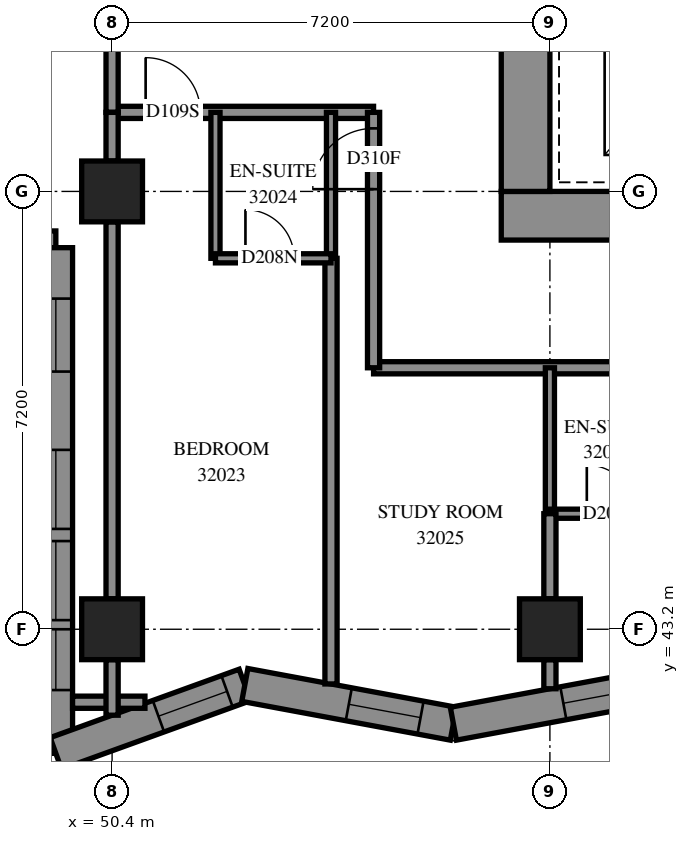
"""IFC4 building model, lengths in metres.
Left out: names, types, materials, properties, quantities, classifications, styles, units other than length and angle.
Written with IfcOpenShell. Run it as: python <this file> out.ifc"""

import sys

from ifc_helpers import new_model, si_unit, direction, frame, frame_2d, origin, origin_2d, place, context, subcontext, project, spatial, polyline, rectangle, outline, extrude, element, fill, save


model = new_model("IFC4")
c1 = context("Model", 3, precision=1e-05, world=origin(), true_north=direction((0.0, 1.0)))
c2 = subcontext(c1, "Body", "Model", "MODEL_VIEW")
j1 = project(units=[si_unit("LENGTHUNIT", "METRE"), si_unit("PLANEANGLEUNIT", "RADIAN")], contexts=[c1])
p1 = place(None, origin())
s1 = spatial("IfcSite", under=j1, at=p1, CompositionType="ELEMENT")
p2 = place(p1, origin())
s2 = spatial("IfcBuilding", under=s1, at=p2, CompositionType="ELEMENT")
p3 = place(p2, frame((0.0, 0.0, 118.6)))
s3 = spatial("IfcBuildingStorey", under=s2, at=p3, CompositionType="ELEMENT", Elevation=118.6)
for number, where, z_axis, x_axis in (
    (1, (50.4, 43.2, 0.0), (0.0, 0.0, 1.0), (1.0, 0.0, 0.0)),
    (2, (50.4, 50.4, 0.0), (0.0, 0.0, 1.0), (1.0, 0.0, 0.0)),
    (3, (57.6, 43.2, 0.0), (0.0, 0.0, 1.0), (1.0, 0.0, 0.0)),
):
    element("IfcColumn", number, at=place(p3, frame(where, z_axis=z_axis, x_axis=x_axis)), inside=s3, PredefinedType="COLUMN", context=c2, shape_type="SweptSolid", body=[
        extrude(rectangle(XDim=1.0, YDim=1.0, at=origin_2d()), origin(), (0.0, 0.0, 1.0), 3.1),
    ])
p4 = place(p3, frame((56.8, 50.0, -0.3), z_axis=(0.0, 0.0, 1.0), x_axis=(1.0, 0.0, 0.0)))
e4 = element("IfcWall", 4, at=p4, inside=s3, PredefinedType="SHEAR", context=c2, shape_type="SweptSolid", body=[
    extrude(rectangle(XDim=16.0, YDim=0.8, at=frame_2d((8.0, 0.0))), origin(), (0.0, 0.0, 1.0), 2.7),
])
p5 = place(p3, frame((57.2, 50.4, -0.3), z_axis=(0.0, 0.0, 1.0), x_axis=(0.0, 1.0, 0.0)))
e5 = element("IfcWall", 5, at=p5, inside=s3, PredefinedType="SHEAR", context=c2, shape_type="SweptSolid", body=[
    extrude(rectangle(XDim=14.4, YDim=0.8, at=frame_2d((7.2, 0.0))), origin(), (0.0, 0.0, 1.0), 2.7),
])
p6 = place(p5, frame((4.55, 0.0, 0.3)))
e6 = element("IfcOpeningElement", 6, at=p6, cuts=e5, PredefinedType="OPENING", context=c2, shape_type="SweptSolid", body=[
    extrude(rectangle(XDim=1.1, YDim=2.1, at=frame_2d((0.55, 1.05))), frame((0.0, 0.41, 0.0), z_axis=(0.0, -1.0, 0.0), x_axis=(1.0, 0.0, 0.0)), (0.0, 0.0, 1.0), 0.82),
])
p7 = place(p5, frame((11.35, 0.0, 0.3)))
e7 = element("IfcOpeningElement", 7, at=p7, cuts=e5, PredefinedType="OPENING", context=c2, shape_type="SweptSolid", body=[
    extrude(rectangle(XDim=1.1, YDim=2.1, at=frame_2d((0.55, 1.05))), frame((0.0, 0.41, 0.0), z_axis=(0.0, -1.0, 0.0), x_axis=(1.0, 0.0, 0.0)), (0.0, 0.0, 1.0), 0.82),
])
p8 = place(p3, frame((42.275, 49.475, 0.0), z_axis=(0.0, 0.0, 1.0), x_axis=(1.0, 0.0, 0.0)))
e8 = element("IfcWall", 8, at=p8, inside=s3, PredefinedType="SOLIDWALL", context=c2, shape_type="SweptSolid", body=[
    extrude(outline(polyline([(-0.275, -0.275), (6.925, -0.275), (7.475, 0.275), (0.275, 0.275), (-0.275, -0.275)])), origin(), (0.0, 0.0, 1.0), 3.1),
])
p9 = place(p8, frame((1.325, 0.0, 0.5)))
e9 = element("IfcOpeningElement", 9, at=p9, cuts=e8, PredefinedType="OPENING", context=c2, shape_type="SweptSolid", body=[
    extrude(rectangle(XDim=1.3, YDim=2.45, at=frame_2d((0.65, 1.225))), frame((0.0, 0.285, 0.0), z_axis=(0.0, -1.0, 0.0), x_axis=(1.0, 0.0, 0.0)), (0.0, 0.0, 1.0), 0.57),
])
p10 = place(p8, frame((2.825, 0.0, 0.5)))
e10 = element("IfcOpeningElement", 10, at=p10, cuts=e8, PredefinedType="OPENING", context=c2, shape_type="SweptSolid", body=[
    extrude(rectangle(XDim=1.3, YDim=2.45, at=frame_2d((0.65, 1.225))), frame((0.0, 0.285, 0.0), z_axis=(0.0, -1.0, 0.0), x_axis=(1.0, 0.0, 0.0)), (0.0, 0.0, 1.0), 0.57),
])
p11 = place(p8, frame((5.162, 0.0, 0.5)))
e11 = element("IfcOpeningElement", 11, at=p11, cuts=e8, PredefinedType="OPENING", context=c2, shape_type="SweptSolid", body=[
    extrude(rectangle(XDim=1.2, YDim=2.45, at=frame_2d((0.6, 1.225))), frame((0.0, 0.285, 0.0), z_axis=(0.0, -1.0, 0.0), x_axis=(1.0, 0.0, 0.0)), (0.0, 0.0, 1.0), 0.57),
])
p12 = place(p3, frame((49.475, 49.475, 0.0), z_axis=(0.0, 0.0, 1.0), x_axis=(0.0, -1.0, 0.0)))
e12 = element("IfcWall", 12, at=p12, inside=s3, PredefinedType="SOLIDWALL", context=c2, shape_type="SweptSolid", body=[
    extrude(outline(polyline([(0.275, -0.275), (8.708, -0.275), (7.924, 0.275), (-0.275, 0.275), (0.275, -0.275)])), origin(), (0.0, 0.0, 1.0), 3.1),
])
p13 = place(p12, frame((3.325, 0.0, 0.5)))
e13 = element("IfcOpeningElement", 13, at=p13, cuts=e12, PredefinedType="OPENING", context=c2, shape_type="SweptSolid", body=[
    extrude(rectangle(XDim=1.3, YDim=2.45, at=frame_2d((0.65, 1.225))), frame((0.0, 0.285, 0.0), z_axis=(0.0, -1.0, 0.0), x_axis=(1.0, 0.0, 0.0)), (0.0, 0.0, 1.0), 0.57),
])
p14 = place(p12, frame((4.825, 0.0, 0.5)))
e14 = element("IfcOpeningElement", 14, at=p14, cuts=e12, PredefinedType="OPENING", context=c2, shape_type="SweptSolid", body=[
    extrude(rectangle(XDim=1.3, YDim=2.45, at=frame_2d((0.65, 1.225))), frame((0.0, 0.285, 0.0), z_axis=(0.0, -1.0, 0.0), x_axis=(1.0, 0.0, 0.0)), (0.0, 0.0, 1.0), 0.57),
])
p15 = place(p12, frame((0.838, 0.0, 0.5)))
e15 = element("IfcOpeningElement", 15, at=p15, cuts=e12, PredefinedType="OPENING", context=c2, shape_type="SweptSolid", body=[
    extrude(rectangle(XDim=1.2, YDim=2.45, at=frame_2d((0.6, 1.225))), frame((0.0, 0.285, 0.0), z_axis=(0.0, -1.0, 0.0), x_axis=(1.0, 0.0, 0.0)), (0.0, 0.0, 1.0), 0.57),
])
p16 = place(p12, frame((6.275, 0.0, 0.45)))
e16 = element("IfcOpeningElement", 16, at=p16, cuts=e12, PredefinedType="OPENING", context=c2, shape_type="SweptSolid", body=[
    extrude(rectangle(XDim=1.0, YDim=2.5, at=frame_2d((0.5, 1.25))), frame((0.0, 0.285, 0.0), z_axis=(0.0, -1.0, 0.0), x_axis=(1.0, 0.0, 0.0)), (0.0, 0.0, 1.0), 0.57),
])
p17 = place(p3, frame((49.475, 41.159, 0.0), z_axis=(0.0, 0.0, 1.0), x_axis=(0.9402923967, 0.3403677552, 0.0)))
e17 = element("IfcWall", 17, at=p17, inside=s3, PredefinedType="SOLIDWALL", context=c2, shape_type="SweptSolid", body=[
    extrude(outline(polyline([(-0.392, -0.275), (3.231, -0.275), (3.38, 0.275), (0.392, 0.275), (-0.392, -0.275)])), origin(), (0.0, 0.0, 1.0), 3.1),
])
p18 = place(p17, frame((1.794, 0.0, 0.5)))
e18 = element("IfcOpeningElement", 18, at=p18, cuts=e17, PredefinedType="OPENING", context=c2, shape_type="SweptSolid", body=[
    extrude(rectangle(XDim=1.2, YDim=2.45, at=frame_2d((0.6, 1.225))), frame((0.0, 0.285, 0.0), z_axis=(0.0, -1.0, 0.0), x_axis=(1.0, 0.0, 0.0)), (0.0, 0.0, 1.0), 0.57),
])
p19 = place(p3, frame((52.583, 42.284, 0.0), z_axis=(0.0, 0.0, 1.0), x_axis=(0.9831685115, -0.1827010621, 0.0)))
e19 = element("IfcWall", 19, at=p19, inside=s3, PredefinedType="SOLIDWALL", context=c2, shape_type="SweptSolid", body=[
    extrude(outline(polyline([(0.075, -0.275), (3.539, -0.275), (3.437, 0.275), (-0.075, 0.275), (0.075, -0.275)])), origin(), (0.0, 0.0, 1.0), 3.1),
])
p20 = place(p19, frame((1.739, 0.0, 0.5)))
e20 = element("IfcOpeningElement", 20, at=p20, cuts=e19, PredefinedType="OPENING", context=c2, shape_type="SweptSolid", body=[
    extrude(rectangle(XDim=1.2, YDim=2.45, at=frame_2d((0.6, 1.225))), frame((0.0, 0.285, 0.0), z_axis=(0.0, -1.0, 0.0), x_axis=(1.0, 0.0, 0.0)), (0.0, 0.0, 1.0), 0.57),
])
p21 = place(p3, frame((56.012, 41.647, 0.0), z_axis=(0.0, 0.0, 1.0), x_axis=(0.9831660022, 0.1827145649, 0.0)))
e21 = element("IfcWall", 21, at=p21, inside=s3, PredefinedType="SOLIDWALL", context=c2, shape_type="SweptSolid", body=[
    extrude(outline(polyline([(-0.051, -0.275), (3.413, -0.275), (3.516, 0.275), (0.051, 0.275), (-0.051, -0.275)])), origin(), (0.0, 0.0, 1.0), 3.1),
])
p22 = place(p21, frame((1.84, 0.0, 0.5)))
e22 = element("IfcOpeningElement", 22, at=p22, cuts=e21, PredefinedType="OPENING", context=c2, shape_type="SweptSolid", body=[
    extrude(rectangle(XDim=1.2, YDim=2.45, at=frame_2d((0.6, 1.225))), frame((0.0, 0.285, 0.0), z_axis=(0.0, -1.0, 0.0), x_axis=(1.0, 0.0, 0.0)), (0.0, 0.0, 1.0), 0.57),
])
p23 = place(p3, frame((54.7, 47.5, 0.0), z_axis=(0.0, 0.0, 1.0), x_axis=(1.0, 0.0, 0.0)))
e23 = element("IfcWall", 23, at=p23, inside=s3, PredefinedType="PARTITIONING", context=c2, shape_type="SweptSolid", body=[
    extrude(rectangle(XDim=19.442, YDim=0.2, at=frame_2d((9.721, 0.0))), origin(), (0.0, 0.0, 1.0), 3.1),
])
p24 = place(p23, frame((5.2, 0.0, 0.0)))
e24 = element("IfcOpeningElement", 24, at=p24, cuts=e23, PredefinedType="OPENING", context=c2, shape_type="SweptSolid", body=[
    extrude(rectangle(XDim=0.9, YDim=2.1, at=frame_2d((0.45, 1.05))), frame((0.0, 0.11, 0.0), z_axis=(0.0, -1.0, 0.0), x_axis=(1.0, 0.0, 0.0)), (0.0, 0.0, 1.0), 0.22),
])
p25 = place(p23, frame((8.757, 0.0, 0.0)))
e25 = element("IfcOpeningElement", 25, at=p25, cuts=e23, PredefinedType="OPENING", context=c2, shape_type="SweptSolid", body=[
    extrude(rectangle(XDim=0.9, YDim=2.1, at=frame_2d((0.45, 1.05))), frame((0.0, 0.11, 0.0), z_axis=(0.0, -1.0, 0.0), x_axis=(1.0, 0.0, 0.0)), (0.0, 0.0, 1.0), 0.22),
])
p26 = place(p23, frame((14.05, 0.0, 0.0)))
e26 = element("IfcOpeningElement", 26, at=p26, cuts=e23, PredefinedType="OPENING", context=c2, shape_type="SweptSolid", body=[
    extrude(rectangle(XDim=0.9, YDim=2.1, at=frame_2d((0.45, 1.05))), frame((0.0, 0.11, 0.0), z_axis=(0.0, -1.0, 0.0), x_axis=(1.0, 0.0, 0.0)), (0.0, 0.0, 1.0), 0.22),
])
p27 = place(p3, frame((54.0, 42.3, 0.0), z_axis=(0.0, 0.0, 1.0), x_axis=(0.0, 1.0, 0.0)))
e27 = element("IfcWall", 27, at=p27, inside=s3, PredefinedType="PARTITIONING", context=c2, shape_type="SweptSolid", body=[
    extrude(rectangle(XDim=7.0, YDim=0.2, at=frame_2d((3.5, 0.0))), origin(), (0.0, 0.0, 1.0), 3.1),
])
p28 = place(p3, frame((50.4, 43.7, 0.0), z_axis=(0.0, 0.0, 1.0), x_axis=(0.0, 1.0, 0.0)))
e28 = element("IfcWall", 28, at=p28, inside=s3, PredefinedType="PARTITIONING", context=c2, shape_type="SweptSolid", body=[
    extrude(rectangle(XDim=6.2, YDim=0.2, at=frame_2d((3.1, 0.0))), origin(), (0.0, 0.0, 1.0), 2.6),
])
p29 = place(p3, frame((50.4, 51.7, 0.0), z_axis=(0.0, 0.0, 1.0), x_axis=(1.0, 0.0, 0.0)))
e29 = element("IfcWall", 29, at=p29, inside=s3, PredefinedType="PARTITIONING", context=c2, shape_type="SweptSolid", body=[
    extrude(rectangle(XDim=4.3, YDim=0.2, at=frame_2d((2.15, 0.0))), origin(), (0.0, 0.0, 1.0), 3.1),
])
p30 = place(p29, frame((0.552, 0.0, 0.0)))
e30 = element("IfcOpeningElement", 30, at=p30, cuts=e29, PredefinedType="OPENING", context=c2, shape_type="SweptSolid", body=[
    extrude(rectangle(XDim=0.9, YDim=2.1, at=frame_2d((0.45, 1.05))), frame((0.0, 0.11, 0.0), z_axis=(0.0, -1.0, 0.0), x_axis=(1.0, 0.0, 0.0)), (0.0, 0.0, 1.0), 0.22),
])
p31 = place(p3, frame((54.7, 47.5, 0.0), z_axis=(0.0, 0.0, 1.0), x_axis=(0.0, 1.0, 0.0)))
e31 = element("IfcWall", 31, at=p31, inside=s3, PredefinedType="PARTITIONING", context=c2, shape_type="SweptSolid", body=[
    extrude(rectangle(XDim=4.2, YDim=0.2, at=frame_2d((2.1, 0.0))), origin(), (0.0, 0.0, 1.0), 3.1),
])
p32 = place(p31, frame((2.937, 0.0, 0.0)))
e32 = element("IfcOpeningElement", 32, at=p32, cuts=e31, PredefinedType="OPENING", context=c2, shape_type="SweptSolid", body=[
    extrude(rectangle(XDim=1.0, YDim=2.1, at=frame_2d((0.5, 1.05))), frame((0.0, 0.11, 0.0), z_axis=(0.0, -1.0, 0.0), x_axis=(1.0, 0.0, 0.0)), (0.0, 0.0, 1.0), 0.22),
])
for number, where, z_axis, x_axis in (
    (33, (52.1, 49.3, 0.0), (0.0, 0.0, 1.0), (0.0, 1.0, 0.0)),
    (34, (54.0, 49.3, 0.0), (0.0, 0.0, 1.0), (0.0, 1.0, 0.0)),
    (35, (57.6, 45.1, 0.0), (0.0, 0.0, 1.0), (0.0, 1.0, 0.0)),
):
    element("IfcWall", number, at=place(p3, frame(where, z_axis=z_axis, x_axis=x_axis)), inside=s3, PredefinedType="PARTITIONING", context=c2, shape_type="SweptSolid", body=[
        extrude(rectangle(XDim=2.4, YDim=0.15, at=frame_2d((1.2, 0.0))), origin(), (0.0, 0.0, 1.0), 3.1),
    ])
p33 = place(p3, frame((50.4, 51.7, 0.0), z_axis=(0.0, 0.0, 1.0), x_axis=(0.0, 1.0, 0.0)))
e36 = element("IfcWall", 36, at=p33, inside=s3, PredefinedType="PARTITIONING", context=c2, shape_type="SweptSolid", body=[
    extrude(rectangle(XDim=2.2, YDim=0.2, at=frame_2d((1.1, 0.0))), origin(), (0.0, 0.0, 1.0), 3.1),
])
p34 = place(p3, frame((52.1, 49.3, 0.0), z_axis=(0.0, 0.0, 1.0), x_axis=(1.0, 0.0, 0.0)))
e37 = element("IfcWall", 37, at=p34, inside=s3, PredefinedType="PARTITIONING", context=c2, shape_type="SweptSolid", body=[
    extrude(rectangle(XDim=1.9, YDim=0.15, at=frame_2d((0.95, 0.0))), origin(), (0.0, 0.0, 1.0), 3.1),
])
p35 = place(p34, frame((0.493, 0.0, 0.0)))
e38 = element("IfcOpeningElement", 38, at=p35, cuts=e37, PredefinedType="OPENING", context=c2, shape_type="SweptSolid", body=[
    extrude(rectangle(XDim=0.8, YDim=2.1, at=frame_2d((0.4, 1.05))), frame((0.0, 0.085, 0.0), z_axis=(0.0, -1.0, 0.0), x_axis=(1.0, 0.0, 0.0)), (0.0, 0.0, 1.0), 0.17),
])
p36 = place(p3, frame((57.6, 45.1, 0.0), z_axis=(0.0, 0.0, 1.0), x_axis=(1.0, 0.0, 0.0)))
e39 = element("IfcWall", 39, at=p36, inside=s3, PredefinedType="PARTITIONING", context=c2, shape_type="SweptSolid", body=[
    extrude(rectangle(XDim=1.9, YDim=0.15, at=frame_2d((0.95, 0.0))), origin(), (0.0, 0.0, 1.0), 3.1),
])
p37 = place(p36, frame((0.607, 0.0, 0.0)))
e40 = element("IfcOpeningElement", 40, at=p37, cuts=e39, PredefinedType="OPENING", context=c2, shape_type="SweptSolid", body=[
    extrude(rectangle(XDim=0.8, YDim=2.1, at=frame_2d((0.4, 1.05))), frame((0.0, 0.085, 0.0), z_axis=(0.0, -1.0, 0.0), x_axis=(1.0, 0.0, 0.0)), (0.0, 0.0, 1.0), 0.17),
])
p38 = place(p3, frame((57.6, 43.7, 0.0), z_axis=(0.0, 0.0, 1.0), x_axis=(0.0, 1.0, 0.0)))
e41 = element("IfcWall", 41, at=p38, inside=s3, PredefinedType="PARTITIONING", context=c2, shape_type="SweptSolid", body=[
    extrude(rectangle(XDim=1.4, YDim=0.2, at=frame_2d((0.7, 0.0))), origin(), (0.0, 0.0, 1.0), 3.1),
])
p39 = place(p3, frame((49.75, 42.0, 0.0), z_axis=(0.0, 0.0, 1.0), x_axis=(1.0, 0.0, 0.0)))
e42 = element("IfcWall", 42, at=p39, inside=s3, PredefinedType="PARTITIONING", context=c2, shape_type="SweptSolid", body=[
    extrude(rectangle(XDim=1.19, YDim=0.2, at=frame_2d((0.595, 0.0))), origin(), (0.0, 0.0, 1.0), 3.1),
])
p40 = place(p3, frame((50.4, 50.9, 0.0), z_axis=(0.0, 0.0, 1.0), x_axis=(0.0, 1.0, 0.0)))
e43 = element("IfcWall", 43, at=p40, inside=s3, PredefinedType="PARTITIONING", context=c2, shape_type="SweptSolid", body=[
    extrude(rectangle(XDim=0.8, YDim=0.2, at=frame_2d((0.4, 0.0))), origin(), (0.0, 0.0, 1.0), 3.1),
])
p41 = place(p3, frame((50.4, 41.786, 0.0), z_axis=(0.0, 0.0, 1.0), x_axis=(0.0, 1.0, 0.0)))
e44 = element("IfcWall", 44, at=p41, inside=s3, PredefinedType="PARTITIONING", context=c2, shape_type="SweptSolid", body=[
    extrude(rectangle(XDim=0.914, YDim=0.2, at=frame_2d((0.457, 0.0))), origin(), (0.0, 0.0, 1.0), 3.1),
])
p42 = place(p3, frame((57.6, 42.221, 0.0), z_axis=(0.0, 0.0, 1.0), x_axis=(0.0, 1.0, 0.0)))
e45 = element("IfcWall", 45, at=p42, inside=s3, PredefinedType="PARTITIONING", context=c2, shape_type="SweptSolid", body=[
    extrude(rectangle(XDim=0.478, YDim=0.2, at=frame_2d((0.239, 0.0))), origin(), (0.0, 0.0, 1.0), 3.1),
])
p43 = place(p13, origin())
e46 = element("IfcWindow", 46, at=p43, inside=s3, PartitioningType="SINGLE_PANEL", PredefinedType="WINDOW", context=c2, shape_type="SweptSolid", body=[
    extrude(rectangle(XDim=1.3, YDim=2.45, at=frame_2d((0.65, 1.225))), frame((0.0, 0.155, 0.0), z_axis=(0.0, -1.0, 0.0), x_axis=(1.0, 0.0, 0.0)), (0.0, 0.0, 1.0), 0.06),
])
fill(e13, e46)
p44 = place(p14, origin())
e47 = element("IfcWindow", 47, at=p44, inside=s3, PartitioningType="SINGLE_PANEL", PredefinedType="WINDOW", context=c2, shape_type="SweptSolid", body=[
    extrude(rectangle(XDim=1.3, YDim=2.45, at=frame_2d((0.65, 1.225))), frame((0.0, 0.155, 0.0), z_axis=(0.0, -1.0, 0.0), x_axis=(1.0, 0.0, 0.0)), (0.0, 0.0, 1.0), 0.06),
])
fill(e14, e47)
p45 = place(p15, origin())
e48 = element("IfcWindow", 48, at=p45, inside=s3, PartitioningType="SINGLE_PANEL", PredefinedType="WINDOW", context=c2, shape_type="SweptSolid", body=[
    extrude(rectangle(XDim=1.2, YDim=2.45, at=frame_2d((0.6, 1.225))), frame((0.0, 0.155, 0.0), z_axis=(0.0, -1.0, 0.0), x_axis=(1.0, 0.0, 0.0)), (0.0, 0.0, 1.0), 0.06),
])
fill(e15, e48)
p46 = place(p18, origin())
e49 = element("IfcWindow", 49, at=p46, inside=s3, PartitioningType="SINGLE_PANEL", PredefinedType="WINDOW", context=c2, shape_type="SweptSolid", body=[
    extrude(rectangle(XDim=1.2, YDim=2.45, at=frame_2d((0.6, 1.225))), frame((0.0, 0.155, 0.0), z_axis=(0.0, -1.0, 0.0), x_axis=(1.0, 0.0, 0.0)), (0.0, 0.0, 1.0), 0.06),
])
fill(e18, e49)
p47 = place(p20, origin())
e50 = element("IfcWindow", 50, at=p47, inside=s3, PartitioningType="SINGLE_PANEL", PredefinedType="WINDOW", context=c2, shape_type="SweptSolid", body=[
    extrude(rectangle(XDim=1.2, YDim=2.45, at=frame_2d((0.6, 1.225))), frame((0.0, 0.155, 0.0), z_axis=(0.0, -1.0, 0.0), x_axis=(1.0, 0.0, 0.0)), (0.0, 0.0, 1.0), 0.06),
])
fill(e20, e50)
p48 = place(p22, origin())
e51 = element("IfcWindow", 51, at=p48, inside=s3, PartitioningType="SINGLE_PANEL", PredefinedType="WINDOW", context=c2, shape_type="SweptSolid", body=[
    extrude(rectangle(XDim=1.2, YDim=2.45, at=frame_2d((0.6, 1.225))), frame((0.0, 0.155, 0.0), z_axis=(0.0, -1.0, 0.0), x_axis=(1.0, 0.0, 0.0)), (0.0, 0.0, 1.0), 0.06),
])
fill(e22, e51)
p49 = place(p30, origin())
e52 = element("IfcDoor", 52, at=p49, inside=s3, OperationType="SINGLE_SWING_LEFT", PredefinedType="DOOR", context=c2, shape_type="SweptSolid", body=[
    extrude(rectangle(XDim=0.9, YDim=2.1, at=frame_2d((0.45, 1.05))), frame((0.0, 0.025, 0.0), z_axis=(0.0, -1.0, 0.0), x_axis=(1.0, 0.0, 0.0)), (0.0, 0.0, 1.0), 0.05),
])
fill(e30, e52)
p50 = place(p35, origin())
e53 = element("IfcDoor", 53, at=p50, inside=s3, OperationType="SINGLE_SWING_RIGHT", PredefinedType="DOOR", context=c2, shape_type="SweptSolid", body=[
    extrude(rectangle(XDim=0.8, YDim=2.1, at=frame_2d((0.4, 1.05))), frame((0.0, 0.025, 0.0), z_axis=(0.0, -1.0, 0.0), x_axis=(1.0, 0.0, 0.0)), (0.0, 0.0, 1.0), 0.05),
])
fill(e38, e53)
p51 = place(p32, origin())
e54 = element("IfcDoor", 54, at=p51, inside=s3, OperationType="SINGLE_SWING_RIGHT", PredefinedType="DOOR", context=c2, shape_type="SweptSolid", body=[
    extrude(rectangle(XDim=1.0, YDim=2.1, at=frame_2d((0.5, 1.05))), frame((0.0, 0.025, 0.0), z_axis=(0.0, -1.0, 0.0), x_axis=(1.0, 0.0, 0.0)), (0.0, 0.0, 1.0), 0.05),
])
fill(e32, e54)
p52 = place(p37, origin())
e55 = element("IfcDoor", 55, at=p52, inside=s3, OperationType="SINGLE_SWING_RIGHT", PredefinedType="DOOR", context=c2, shape_type="SweptSolid", body=[
    extrude(rectangle(XDim=0.8, YDim=2.1, at=frame_2d((0.4, 1.05))), frame((0.0, 0.025, 0.0), z_axis=(0.0, -1.0, 0.0), x_axis=(1.0, 0.0, 0.0)), (0.0, 0.0, 1.0), 0.05),
])
fill(e40, e55)
p53 = place(p16, origin())
e56 = element("IfcWindow", 56, at=p53, inside=s3, PartitioningType="SINGLE_PANEL", PredefinedType="WINDOW", context=c2, shape_type="SweptSolid", body=[
    extrude(rectangle(XDim=1.0, YDim=2.5, at=frame_2d((0.5, 1.25))), frame((0.0, 0.155, 0.0), z_axis=(0.0, -1.0, 0.0), x_axis=(1.0, 0.0, 0.0)), (0.0, 0.0, 1.0), 0.06),
])
fill(e16, e56)
save(model, sys.argv[1])
